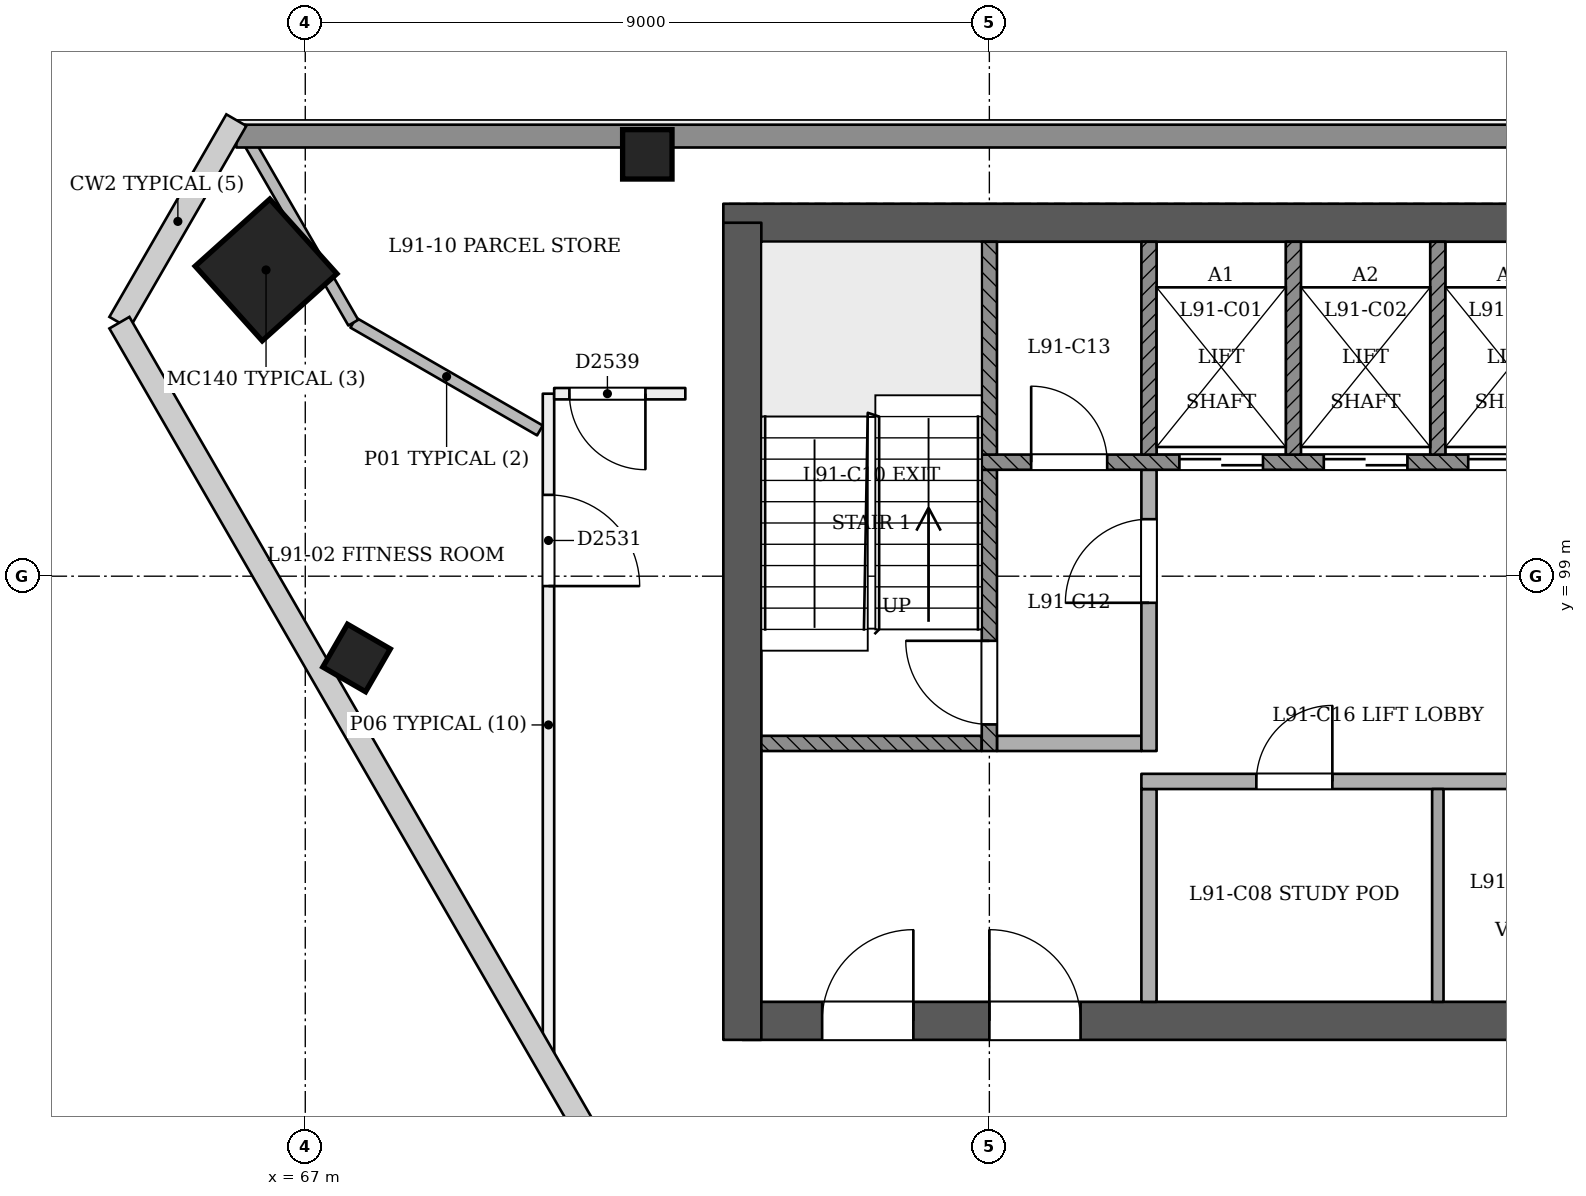
"""IFC4 building model, lengths in metres.
Left out: names, types, materials, properties, quantities, classifications, styles, units other than length and angle.
Written with IfcOpenShell. Run it as: python <this file> out.ifc"""

import sys

from ifc_helpers import new_model, si_unit, direction, frame, frame_2d, origin, origin_2d, place, context, subcontext, project, spatial, rectangle, extrude, element, fill, save


model = new_model("IFC4")
c1 = context("Model", 3, precision=1e-05, world=origin(), true_north=direction((0.0, 1.0)))
c2 = subcontext(c1, "Body", "Model", "MODEL_VIEW")
j1 = project(units=[si_unit("LENGTHUNIT", "METRE"), si_unit("PLANEANGLEUNIT", "RADIAN")], contexts=[c1])
p1 = place(None, origin())
s1 = spatial("IfcSite", under=j1, at=p1, CompositionType="ELEMENT")
p2 = place(p1, origin())
s2 = spatial("IfcBuilding", under=s1, at=p2, CompositionType="ELEMENT")
p3 = place(p2, frame((0.0, 0.0, 350.8)))
s3 = spatial("IfcBuildingStorey", under=s2, at=p3, CompositionType="ELEMENT", Elevation=350.8)
p4 = place(p3, frame((72.75, 93.15, 0.0), z_axis=(0.0, 0.0, 1.0), x_axis=(1.0, 0.0, 0.0)))
e1 = element("IfcWall", 1, at=p4, inside=s3, PredefinedType="SHEAR", context=c2, shape_type="SweptSolid", body=[
    extrude(rectangle(XDim=24.75, YDim=0.5, at=frame_2d((12.375, 0.0))), origin(), (0.0, 0.0, 1.0), 3.6),
])
p5 = place(p4, frame((1.05, 0.0, 0.0)))
e2 = element("IfcOpeningElement", 2, at=p5, cuts=e1, PredefinedType="OPENING", context=c2, shape_type="SweptSolid", body=[
    extrude(rectangle(XDim=1.2, YDim=2.1, at=frame_2d((0.6, 1.05))), frame((0.0, 0.26, 0.0), z_axis=(0.0, -1.0, 0.0), x_axis=(1.0, 0.0, 0.0)), (0.0, 0.0, 1.0), 0.521),
])
p6 = place(p4, frame((3.25, 0.0, 0.0)))
e3 = element("IfcOpeningElement", 3, at=p6, cuts=e1, PredefinedType="OPENING", context=c2, shape_type="SweptSolid", body=[
    extrude(rectangle(XDim=1.2, YDim=2.1, at=frame_2d((0.6, 1.05))), frame((0.0, 0.26, 0.0), z_axis=(0.0, -1.0, 0.0), x_axis=(1.0, 0.0, 0.0)), (0.0, 0.0, 1.0), 0.521),
])
p7 = place(p4, frame((13.25, 0.0, 0.0)))
e4 = element("IfcOpeningElement", 4, at=p7, cuts=e1, PredefinedType="OPENING", context=c2, shape_type="SweptSolid", body=[
    extrude(rectangle(XDim=1.2, YDim=2.1, at=frame_2d((0.6, 1.05))), frame((0.0, 0.26, 0.0), z_axis=(0.0, -1.0, 0.0), x_axis=(1.0, 0.0, 0.0)), (0.0, 0.0, 1.0), 0.521),
])
p8 = place(p4, frame((15.712, 0.0, 0.0)))
e5 = element("IfcOpeningElement", 5, at=p8, cuts=e1, PredefinedType="OPENING", context=c2, shape_type="SweptSolid", body=[
    extrude(rectangle(XDim=1.0, YDim=2.1, at=frame_2d((0.5, 1.05))), frame((0.0, 0.26, 0.0), z_axis=(0.0, -1.0, 0.0), x_axis=(1.0, 0.0, 0.0)), (0.0, 0.0, 1.0), 0.521),
])
p9 = place(p4, frame((18.15, 0.0, 0.0)))
e6 = element("IfcOpeningElement", 6, at=p9, cuts=e1, PredefinedType="OPENING", context=c2, shape_type="SweptSolid", body=[
    extrude(rectangle(XDim=1.0, YDim=2.1, at=frame_2d((0.5, 1.05))), frame((0.0, 0.26, 0.0), z_axis=(0.0, -1.0, 0.0), x_axis=(1.0, 0.0, 0.0)), (0.0, 0.0, 1.0), 0.521),
])
p10 = place(p4, frame((20.5, 0.0, 0.0)))
e7 = element("IfcOpeningElement", 7, at=p10, cuts=e1, PredefinedType="OPENING", context=c2, shape_type="SweptSolid", body=[
    extrude(rectangle(XDim=1.0, YDim=2.1, at=frame_2d((0.5, 1.05))), frame((0.0, 0.26, 0.0), z_axis=(0.0, -1.0, 0.0), x_axis=(1.0, 0.0, 0.0)), (0.0, 0.0, 1.0), 0.521),
])
p11 = place(p4, frame((22.788, 0.0, 0.0)))
e8 = element("IfcOpeningElement", 8, at=p11, cuts=e1, PredefinedType="OPENING", context=c2, shape_type="SweptSolid", body=[
    extrude(rectangle(XDim=1.0, YDim=2.1, at=frame_2d((0.5, 1.05))), frame((0.0, 0.26, 0.0), z_axis=(0.0, -1.0, 0.0), x_axis=(1.0, 0.0, 0.0)), (0.0, 0.0, 1.0), 0.521),
])
p12 = place(p3, frame((97.25, 103.65, 0.0), z_axis=(0.0, 0.0, 1.0), x_axis=(-1.0, 0.0, 0.0)))
e9 = element("IfcWall", 9, at=p12, inside=s3, PredefinedType="SHEAR", context=c2, shape_type="SweptSolid", body=[
    extrude(rectangle(XDim=24.75, YDim=0.5, at=frame_2d((12.375, 0.0))), origin(), (0.0, 0.0, 1.0), 3.6),
])
p13 = place(p3, frame((72.75, 103.65, 0.0), z_axis=(0.0, 0.0, 1.0), x_axis=(0.0, -1.0, 0.0)))
e10 = element("IfcWall", 10, at=p13, inside=s3, PredefinedType="SHEAR", context=c2, shape_type="SweptSolid", body=[
    extrude(rectangle(XDim=10.75, YDim=0.5, at=frame_2d((5.375, 0.0))), origin(), (0.0, 0.0, 1.0), 3.6),
])
p14 = place(p3, frame((66.45, 103.018, 0.0), z_axis=(0.028403721265, 0.009287135593, 0.999553389135), x_axis=(-0.866198986699, 0.499299819348, 0.019975130565)))
e11 = element("IfcColumn", 11, at=p14, inside=s3, PredefinedType="COLUMN", context=c2, shape_type="SweptSolid", body=[
    extrude(rectangle(XDim=1.32, YDim=1.32, at=origin_2d()), origin(), (0.0, 0.0, 1.0), 3.602),
])
p15 = place(p3, frame((71.5, 104.55, 0.0), z_axis=(0.0, 0.0, 1.0), x_axis=(1.0, 0.0, 0.0)))
e12 = element("IfcColumn", 12, at=p15, inside=s3, PredefinedType="COLUMN", context=c2, shape_type="SweptSolid", body=[
    extrude(rectangle(XDim=0.65, YDim=0.65, at=origin_2d()), origin(), (0.0, 0.0, 1.0), 3.6),
])
p16 = place(p3, frame((67.647, 97.877, -0.02), z_axis=(0.022153634206, 0.038480930364, 0.999013730882), x_axis=(-0.864982414942, -0.500326646225, 0.038453464312)))
e13 = element("IfcColumn", 13, at=p16, inside=s3, PredefinedType="COLUMN", context=c2, shape_type="SweptSolid", body=[
    extrude(rectangle(XDim=0.65, YDim=0.65, at=origin_2d()), origin(), (0.0, 0.0, 1.0), 3.604),
])
p17 = place(p3, frame((70.2, 101.401, 0.0), z_axis=(0.0, 0.0, 1.0), x_axis=(2.8011989e-05, -0.999999999608, 0.0)))
e14 = element("IfcWall", 14, at=p17, inside=s3, PredefinedType="PARTITIONING", context=c2, shape_type="SweptSolid", body=[
    extrude(rectangle(XDim=8.716, YDim=0.15, at=frame_2d((4.358, 0.0))), origin(), (0.0, 0.0, 1.0), 2.7),
])
p18 = place(p17, frame((1.331, 0.0, 0.0)))
e15 = element("IfcOpeningElement", 15, at=p18, cuts=e14, PredefinedType="OPENING", context=c2, shape_type="SweptSolid", body=[
    extrude(rectangle(XDim=1.2, YDim=2.1, at=frame_2d((0.6, 1.05))), frame((0.0, 0.085, 0.0), z_axis=(0.0, -1.0, 0.0), x_axis=(1.0, 0.0, 0.0)), (0.0, 0.0, 1.0), 0.171),
])
p19 = place(p3, frame((72.0, 101.401, 0.0), z_axis=(0.0, 0.0, 1.0), x_axis=(-1.0, 0.0, 0.0)))
e16 = element("IfcWall", 16, at=p19, inside=s3, PredefinedType="PARTITIONING", context=c2, shape_type="SweptSolid", body=[
    extrude(rectangle(XDim=1.725, YDim=0.15, at=frame_2d((0.863, 0.0))), origin(), (0.0, 0.0, 1.0), 3.2),
])
p20 = place(p19, frame((0.525, 0.0, 0.0)))
e17 = element("IfcOpeningElement", 17, at=p20, cuts=e16, PredefinedType="OPENING", context=c2, shape_type="SweptSolid", body=[
    extrude(rectangle(XDim=1.0, YDim=2.1, at=frame_2d((0.5, 1.05))), frame((0.0, 0.085, 0.0), z_axis=(0.0, -1.0, 0.0), x_axis=(1.0, 0.0, 0.0)), (0.0, 0.0, 1.0), 0.171),
])
p21 = place(p3, frame((70.087, 100.917, 0.0), z_axis=(0.0, 0.0, 1.0), x_axis=(-0.866024993943, 0.500000709865, 0.0)))
e18 = element("IfcWall", 18, at=p21, inside=s3, PredefinedType="PARTITIONING", context=c2, shape_type="SweptSolid", body=[
    extrude(rectangle(XDim=2.835, YDim=0.15, at=frame_2d((1.418, 0.0))), origin(), (0.0, 0.0, 1.0), 3.2),
])
p22 = place(p3, frame((67.632, 102.335, 0.0), z_axis=(0.0, 0.0, 1.0), x_axis=(-0.499996007168, 0.866027709035, 0.0)))
e19 = element("IfcWall", 19, at=p22, inside=s3, PredefinedType="PARTITIONING", context=c2, shape_type="SweptSolid", body=[
    extrude(rectangle(XDim=2.961, YDim=0.15, at=frame_2d((1.481, 0.0))), origin(), (0.0, 0.0, 1.0), 2.7),
])
p23 = place(p3, frame((66.093, 104.79, 0.0), z_axis=(0.0, 0.0, 1.0), x_axis=(1.0, 0.0, 0.0)))
e20 = element("IfcWall", 20, at=p23, inside=s3, PredefinedType="SOLIDWALL", context=c2, shape_type="SweptSolid", body=[
    extrude(rectangle(XDim=37.813, YDim=0.3, at=frame_2d((18.907, 0.0))), origin(), (0.0, 0.0, 1.0), 2.7),
])
p24 = place(p3, frame((78.1, 93.4, 0.0), z_axis=(0.0, 0.0, 1.0), x_axis=(0.0, 1.0, 0.0)))
e21 = element("IfcWall", 21, at=p24, inside=s3, PredefinedType="PARTITIONING", context=c2, shape_type="SweptSolid", body=[
    extrude(rectangle(XDim=2.8, YDim=0.2, at=frame_2d((1.4, 0.0))), origin(), (0.0, 0.0, 1.0), 3.2),
])
p25 = place(p3, frame((81.9, 93.4, 0.0), z_axis=(0.0, 0.0, 1.0), x_axis=(0.0, 1.0, 0.0)))
e22 = element("IfcWall", 22, at=p25, inside=s3, PredefinedType="PARTITIONING", context=c2, shape_type="SweptSolid", body=[
    extrude(rectangle(XDim=2.8, YDim=0.15, at=frame_2d((1.4, 0.0))), origin(), (0.0, 0.0, 1.0), 3.2),
])
p26 = place(p3, frame((78.0, 96.3, 0.0), z_axis=(0.0, 0.0, 1.0), x_axis=(1.0, 0.0, 0.0)))
e23 = element("IfcWall", 23, at=p26, inside=s3, PredefinedType="PARTITIONING", context=c2, shape_type="SweptSolid", body=[
    extrude(rectangle(XDim=7.8, YDim=0.2, at=frame_2d((3.9, 0.0))), origin(), (0.0, 0.0, 1.0), 3.2),
])
p27 = place(p26, frame((1.512, 0.0, 0.0)))
e24 = element("IfcOpeningElement", 24, at=p27, cuts=e23, PredefinedType="OPENING", context=c2, shape_type="SweptSolid", body=[
    extrude(rectangle(XDim=1.0, YDim=2.1, at=frame_2d((0.5, 1.05))), frame((0.0, 0.11, 0.0), z_axis=(0.0, -1.0, 0.0), x_axis=(1.0, 0.0, 0.0)), (0.0, 0.0, 1.0), 0.221),
])
p28 = place(p26, frame((5.288, 0.0, 0.0)))
e25 = element("IfcOpeningElement", 25, at=p28, cuts=e23, PredefinedType="OPENING", context=c2, shape_type="SweptSolid", body=[
    extrude(rectangle(XDim=1.0, YDim=2.1, at=frame_2d((0.5, 1.05))), frame((0.0, 0.11, 0.0), z_axis=(0.0, -1.0, 0.0), x_axis=(1.0, 0.0, 0.0)), (0.0, 0.0, 1.0), 0.221),
])
p29 = place(p3, frame((73.0, 96.8, 0.0), z_axis=(0.0, 0.0, 1.0), x_axis=(1.0, 0.0, 0.0)))
e26 = element("IfcWall", 26, at=p29, inside=s3, PredefinedType="SOLIDWALL", context=c2, shape_type="SweptSolid", body=[
    extrude(rectangle(XDim=2.9, YDim=0.2, at=frame_2d((1.45, 0.0))), origin(), (0.0, 0.0, 1.0), 3.2),
])
p30 = place(p3, frame((76.0, 96.7, 0.0), z_axis=(0.0, 0.0, 1.0), x_axis=(0.0, 1.0, 0.0)))
e27 = element("IfcWall", 27, at=p30, inside=s3, PredefinedType="SOLIDWALL", context=c2, shape_type="SweptSolid", body=[
    extrude(rectangle(XDim=3.7, YDim=0.2, at=frame_2d((1.85, 0.0))), origin(), (0.0, 0.0, 1.0), 3.2),
])
p31 = place(p30, frame((0.35, 0.0, 0.0)))
e28 = element("IfcOpeningElement", 28, at=p31, cuts=e27, PredefinedType="OPENING", context=c2, shape_type="SweptSolid", body=[
    extrude(rectangle(XDim=1.1, YDim=2.1, at=frame_2d((0.55, 1.05))), frame((0.0, 0.11, 0.0), z_axis=(0.0, -1.0, 0.0), x_axis=(1.0, 0.0, 0.0)), (0.0, 0.0, 1.0), 0.221),
])
p32 = place(p3, frame((76.1, 96.8, 0.0), z_axis=(0.0, 0.0, 1.0), x_axis=(1.0, 0.0, 0.0)))
e29 = element("IfcWall", 29, at=p32, inside=s3, PredefinedType="PARTITIONING", context=c2, shape_type="SweptSolid", body=[
    extrude(rectangle(XDim=1.9, YDim=0.2, at=frame_2d((0.95, 0.0))), origin(), (0.0, 0.0, 1.0), 3.2),
])
p33 = place(p3, frame((78.1, 96.7, 0.0), z_axis=(0.0, 0.0, 1.0), x_axis=(0.0, 1.0, 0.0)))
e30 = element("IfcWall", 30, at=p33, inside=s3, PredefinedType="PARTITIONING", context=c2, shape_type="SweptSolid", body=[
    extrude(rectangle(XDim=3.7, YDim=0.2, at=frame_2d((1.85, 0.0))), origin(), (0.0, 0.0, 1.0), 3.2),
])
p34 = place(p33, frame((1.95, 0.0, 0.0)))
e31 = element("IfcOpeningElement", 31, at=p34, cuts=e30, PredefinedType="OPENING", context=c2, shape_type="SweptSolid", body=[
    extrude(rectangle(XDim=1.1, YDim=2.1, at=frame_2d((0.55, 1.05))), frame((0.0, 0.11, 0.0), z_axis=(0.0, -1.0, 0.0), x_axis=(1.0, 0.0, 0.0)), (0.0, 0.0, 1.0), 0.221),
])
p35 = place(p3, frame((75.9, 100.5, 0.0), z_axis=(0.0, 0.0, 1.0), x_axis=(1.0, 0.0, 0.0)))
e32 = element("IfcWall", 32, at=p35, inside=s3, PredefinedType="SOLIDWALL", context=c2, shape_type="SweptSolid", body=[
    extrude(rectangle(XDim=18.2, YDim=0.2, at=frame_2d((9.1, 0.0))), origin(), (0.0, 0.0, 1.0), 3.2),
])
p36 = place(p35, frame((2.6, 0.0, 0.0)))
e33 = element("IfcOpeningElement", 33, at=p36, cuts=e32, PredefinedType="OPENING", context=c2, shape_type="SweptSolid", body=[
    extrude(rectangle(XDim=1.1, YDim=2.1, at=frame_2d((0.55, 1.05))), frame((0.0, 0.11, 0.0), z_axis=(0.0, -1.0, 0.0), x_axis=(1.0, 0.0, 0.0)), (0.0, 0.0, 1.0), 0.221),
])
p37 = place(p35, frame((4.5, 0.0, 0.0)))
e34 = element("IfcOpeningElement", 34, at=p37, cuts=e32, PredefinedType="OPENING", context=c2, shape_type="SweptSolid", body=[
    extrude(rectangle(XDim=1.1, YDim=2.1, at=frame_2d((0.55, 1.05))), frame((0.0, 0.11, 0.0), z_axis=(0.0, -1.0, 0.0), x_axis=(1.0, 0.0, 0.0)), (0.0, 0.0, 1.0), 0.221),
])
p38 = place(p35, frame((6.4, 0.0, 0.0)))
e35 = element("IfcOpeningElement", 35, at=p38, cuts=e32, PredefinedType="OPENING", context=c2, shape_type="SweptSolid", body=[
    extrude(rectangle(XDim=1.1, YDim=2.1, at=frame_2d((0.55, 1.05))), frame((0.0, 0.11, 0.0), z_axis=(0.0, -1.0, 0.0), x_axis=(1.0, 0.0, 0.0)), (0.0, 0.0, 1.0), 0.221),
])
p39 = place(p35, frame((8.3, 0.0, 0.0)))
e36 = element("IfcOpeningElement", 36, at=p39, cuts=e32, PredefinedType="OPENING", context=c2, shape_type="SweptSolid", body=[
    extrude(rectangle(XDim=1.1, YDim=2.1, at=frame_2d((0.55, 1.05))), frame((0.0, 0.11, 0.0), z_axis=(0.0, -1.0, 0.0), x_axis=(1.0, 0.0, 0.0)), (0.0, 0.0, 1.0), 0.221),
])
p40 = place(p35, frame((10.2, 0.0, 0.0)))
e37 = element("IfcOpeningElement", 37, at=p40, cuts=e32, PredefinedType="OPENING", context=c2, shape_type="SweptSolid", body=[
    extrude(rectangle(XDim=1.1, YDim=2.1, at=frame_2d((0.55, 1.05))), frame((0.0, 0.11, 0.0), z_axis=(0.0, -1.0, 0.0), x_axis=(1.0, 0.0, 0.0)), (0.0, 0.0, 1.0), 0.221),
])
p41 = place(p35, frame((12.1, 0.0, 0.0)))
e38 = element("IfcOpeningElement", 38, at=p41, cuts=e32, PredefinedType="OPENING", context=c2, shape_type="SweptSolid", body=[
    extrude(rectangle(XDim=1.1, YDim=2.1, at=frame_2d((0.55, 1.05))), frame((0.0, 0.11, 0.0), z_axis=(0.0, -1.0, 0.0), x_axis=(1.0, 0.0, 0.0)), (0.0, 0.0, 1.0), 0.221),
])
p42 = place(p35, frame((14.0, 0.0, 0.0)))
e39 = element("IfcOpeningElement", 39, at=p42, cuts=e32, PredefinedType="OPENING", context=c2, shape_type="SweptSolid", body=[
    extrude(rectangle(XDim=1.1, YDim=2.1, at=frame_2d((0.55, 1.05))), frame((0.0, 0.11, 0.0), z_axis=(0.0, -1.0, 0.0), x_axis=(1.0, 0.0, 0.0)), (0.0, 0.0, 1.0), 0.221),
])
p43 = place(p35, frame((0.65, 0.0, 0.0)))
e40 = element("IfcOpeningElement", 40, at=p43, cuts=e32, PredefinedType="OPENING", context=c2, shape_type="SweptSolid", body=[
    extrude(rectangle(XDim=1.0, YDim=2.1, at=frame_2d((0.5, 1.05))), frame((0.0, 0.11, 0.0), z_axis=(0.0, -1.0, 0.0), x_axis=(1.0, 0.0, 0.0)), (0.0, 0.0, 1.0), 0.221),
])
p44 = place(p35, frame((16.3, 0.0, 0.0)))
e41 = element("IfcOpeningElement", 41, at=p44, cuts=e32, PredefinedType="OPENING", context=c2, shape_type="SweptSolid", body=[
    extrude(rectangle(XDim=1.0, YDim=2.1, at=frame_2d((0.5, 1.05))), frame((0.0, 0.11, 0.0), z_axis=(0.0, -1.0, 0.0), x_axis=(1.0, 0.0, 0.0)), (0.0, 0.0, 1.0), 0.221),
])
for number, where, z_axis, x_axis in (
    (42, (76.0, 100.6, 0.0), (0.0, 0.0, 1.0), (0.0, 1.0, 0.0)),
    (43, (78.1, 100.6, 0.0), (0.0, 0.0, 1.0), (0.0, 1.0, 0.0)),
    (44, (80.0, 100.6, 0.0), (0.0, 0.0, 1.0), (0.0, 1.0, 0.0)),
    (45, (81.9, 100.6, 0.0), (0.0, 0.0, 1.0), (0.0, 1.0, 0.0)),
):
    element("IfcWall", number, at=place(p3, frame(where, z_axis=z_axis, x_axis=x_axis)), inside=s3, PredefinedType="SOLIDWALL", context=c2, shape_type="SweptSolid", body=[
        extrude(rectangle(XDim=2.8, YDim=0.2, at=frame_2d((1.4, 0.0))), origin(), (0.0, 0.0, 1.0), 3.2),
    ])
p45 = place(p18, origin())
e46 = element("IfcDoor", 46, at=p45, inside=s3, OperationType="SINGLE_SWING_RIGHT", PredefinedType="NOTDEFINED", context=c2, shape_type="SweptSolid", body=[
    extrude(rectangle(XDim=1.2, YDim=2.1, at=frame_2d((0.6, 1.05))), frame((0.0, 0.025, 0.0), z_axis=(0.0, -1.0, 0.0), x_axis=(1.0, 0.0, 0.0)), (0.0, 0.0, 1.0), 0.05),
])
fill(e15, e46)
p46 = place(p20, origin())
e47 = element("IfcDoor", 47, at=p46, inside=s3, OperationType="SINGLE_SWING_LEFT", PredefinedType="NOTDEFINED", context=c2, shape_type="SweptSolid", body=[
    extrude(rectangle(XDim=1.0, YDim=2.1, at=frame_2d((0.5, 1.05))), frame((0.0, 0.025, 0.0), z_axis=(0.0, -1.0, 0.0), x_axis=(1.0, 0.0, 0.0)), (0.0, 0.0, 1.0), 0.05),
])
fill(e17, e47)
p47 = place(p36, origin())
e48 = element("IfcDoor", 48, at=p47, inside=s3, OperationType="SLIDING_TO_RIGHT", PredefinedType="NOTDEFINED", context=c2, shape_type="SweptSolid", body=[
    extrude(rectangle(XDim=1.1, YDim=2.1, at=frame_2d((0.55, 1.05))), frame((0.0, 0.025, 0.0), z_axis=(0.0, -1.0, 0.0), x_axis=(1.0, 0.0, 0.0)), (0.0, 0.0, 1.0), 0.05),
])
fill(e33, e48)
p48 = place(p37, origin())
e49 = element("IfcDoor", 49, at=p48, inside=s3, OperationType="SLIDING_TO_LEFT", PredefinedType="NOTDEFINED", context=c2, shape_type="SweptSolid", body=[
    extrude(rectangle(XDim=1.1, YDim=2.1, at=frame_2d((0.55, 1.05))), frame((0.0, 0.025, 0.0), z_axis=(0.0, -1.0, 0.0), x_axis=(1.0, 0.0, 0.0)), (0.0, 0.0, 1.0), 0.05),
])
fill(e34, e49)
p49 = place(p38, origin())
e50 = element("IfcDoor", 50, at=p49, inside=s3, OperationType="SLIDING_TO_RIGHT", PredefinedType="NOTDEFINED", context=c2, shape_type="SweptSolid", body=[
    extrude(rectangle(XDim=1.1, YDim=2.1, at=frame_2d((0.55, 1.05))), frame((0.0, 0.025, 0.0), z_axis=(0.0, -1.0, 0.0), x_axis=(1.0, 0.0, 0.0)), (0.0, 0.0, 1.0), 0.05),
])
fill(e35, e50)
p50 = place(p31, origin())
e51 = element("IfcDoor", 51, at=p50, inside=s3, OperationType="SINGLE_SWING_RIGHT", PredefinedType="NOTDEFINED", context=c2, shape_type="SweptSolid", body=[
    extrude(rectangle(XDim=1.1, YDim=2.1, at=frame_2d((0.55, 1.05))), frame((0.0, 0.025, 0.0), z_axis=(0.0, -1.0, 0.0), x_axis=(1.0, 0.0, 0.0)), (0.0, 0.0, 1.0), 0.05),
])
fill(e28, e51)
p51 = place(p34, origin())
e52 = element("IfcDoor", 52, at=p51, inside=s3, OperationType="SINGLE_SWING_LEFT", PredefinedType="NOTDEFINED", context=c2, shape_type="SweptSolid", body=[
    extrude(rectangle(XDim=1.1, YDim=2.1, at=frame_2d((0.55, 1.05))), frame((0.0, 0.025, 0.0), z_axis=(0.0, -1.0, 0.0), x_axis=(1.0, 0.0, 0.0)), (0.0, 0.0, 1.0), 0.05),
])
fill(e31, e52)
p52 = place(p5, origin())
e53 = element("IfcDoor", 53, at=p52, inside=s3, OperationType="SINGLE_SWING_RIGHT", PredefinedType="NOTDEFINED", context=c2, shape_type="SweptSolid", body=[
    extrude(rectangle(XDim=1.2, YDim=2.1, at=frame_2d((0.6, 1.05))), frame((0.0, 0.025, 0.0), z_axis=(0.0, -1.0, 0.0), x_axis=(1.0, 0.0, 0.0)), (0.0, 0.0, 1.0), 0.05),
])
fill(e2, e53)
p53 = place(p6, origin())
e54 = element("IfcDoor", 54, at=p53, inside=s3, OperationType="SINGLE_SWING_LEFT", PredefinedType="NOTDEFINED", context=c2, shape_type="SweptSolid", body=[
    extrude(rectangle(XDim=1.2, YDim=2.1, at=frame_2d((0.6, 1.05))), frame((0.0, 0.025, 0.0), z_axis=(0.0, -1.0, 0.0), x_axis=(1.0, 0.0, 0.0)), (0.0, 0.0, 1.0), 0.05),
])
fill(e3, e54)
p54 = place(p43, origin())
e55 = element("IfcDoor", 55, at=p54, inside=s3, OperationType="SINGLE_SWING_LEFT", PredefinedType="NOTDEFINED", context=c2, shape_type="SweptSolid", body=[
    extrude(rectangle(XDim=1.0, YDim=2.1, at=frame_2d((0.5, 1.05))), frame((0.0, 0.025, 0.0), z_axis=(0.0, -1.0, 0.0), x_axis=(1.0, 0.0, 0.0)), (0.0, 0.0, 1.0), 0.05),
])
fill(e40, e55)
p55 = place(p27, origin())
e56 = element("IfcDoor", 56, at=p55, inside=s3, OperationType="SINGLE_SWING_RIGHT", PredefinedType="NOTDEFINED", context=c2, shape_type="SweptSolid", body=[
    extrude(rectangle(XDim=1.0, YDim=2.1, at=frame_2d((0.5, 1.05))), frame((0.0, 0.025, 0.0), z_axis=(0.0, -1.0, 0.0), x_axis=(1.0, 0.0, 0.0)), (0.0, 0.0, 1.0), 0.05),
])
fill(e24, e56)
save(model, sys.argv[1])
